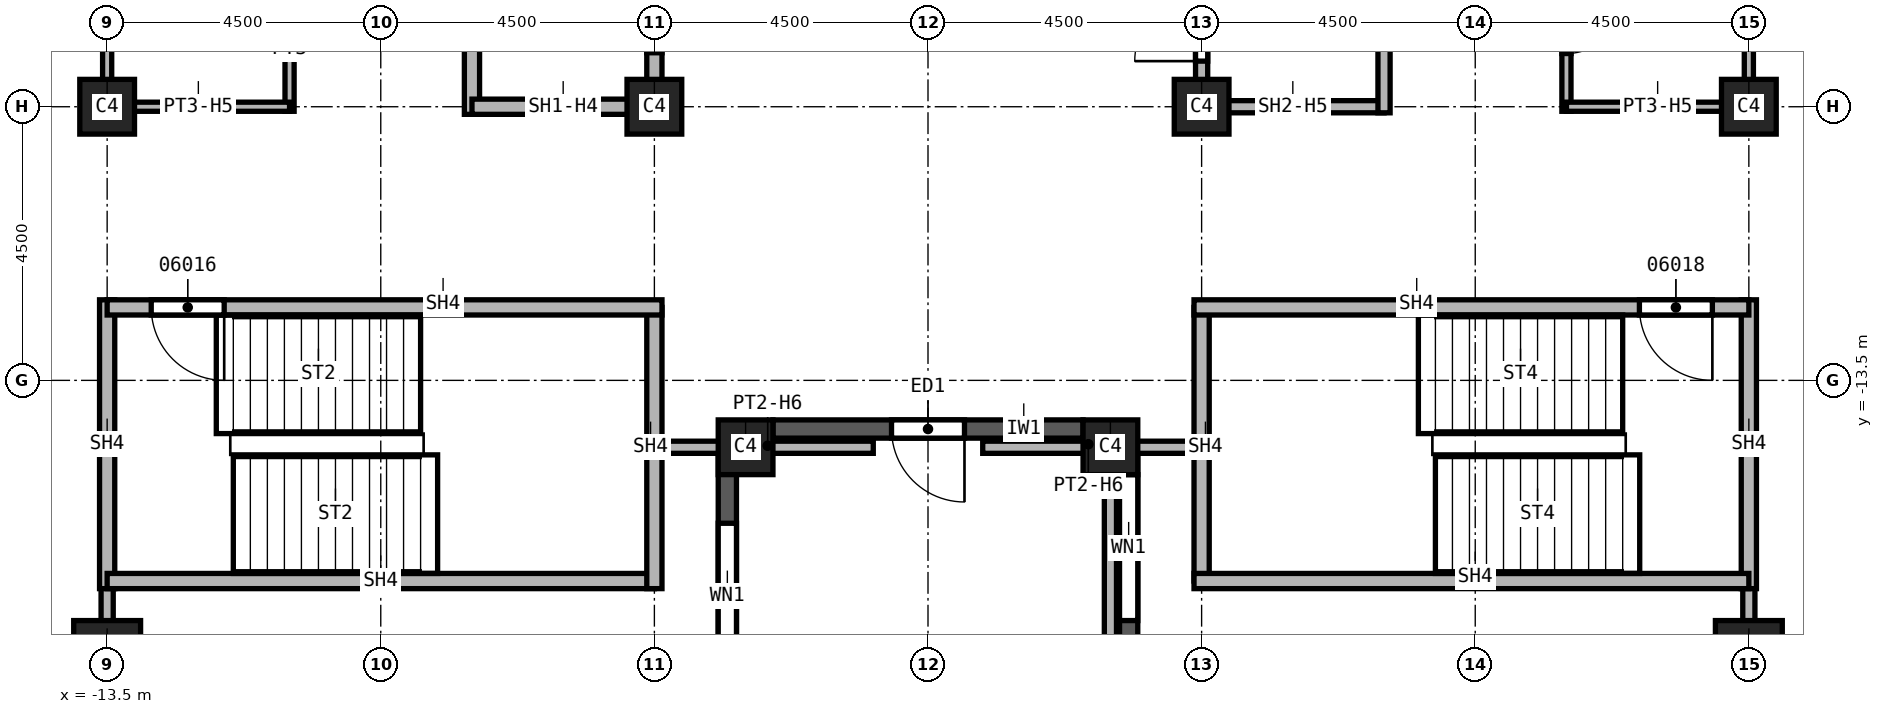
"""IFC4 building model, lengths in metres.
Left out: names, types, materials, properties, quantities, classifications, styles, units other than length and angle.
Written with IfcOpenShell. Run it as: python <this file> out.ifc"""

import sys

from ifc_helpers import new_model, si_unit, direction, frame, frame_2d, origin, origin_2d, place, context, subcontext, project, spatial, rectangle, extrude, element, fill, save


model = new_model("IFC4")
c1 = context("Model", 3, precision=1e-05, world=origin(), true_north=direction((0.0, 1.0)))
c2 = subcontext(c1, "Body", "Model", "MODEL_VIEW")
j1 = project(units=[si_unit("LENGTHUNIT", "METRE"), si_unit("PLANEANGLEUNIT", "RADIAN")], contexts=[c1])
p1 = place(None, origin())
s1 = spatial("IfcSite", under=j1, at=p1, CompositionType="ELEMENT")
p2 = place(p1, origin())
s2 = spatial("IfcBuilding", under=s1, at=p2, CompositionType="ELEMENT")
p3 = place(p2, frame((0.0, 0.0, 126.0)))
s3 = spatial("IfcBuildingStorey", under=s2, at=p3, CompositionType="ELEMENT", Elevation=126.0)
for number, where, z_axis, x_axis in (
    (1, (13.5, -18.0, 0.0), (0.0, 0.0, 1.0), (1.0, 0.0, 0.0)),
    (2, (-13.5, -18.0, 0.0), (0.0, 0.0, 1.0), (1.0, 0.0, 0.0)),
):
    element("IfcColumn", number, at=place(p3, frame(where, z_axis=z_axis, x_axis=x_axis)), inside=s3, PredefinedType="COLUMN", context=c2, shape_type="SweptSolid", body=[
        extrude(rectangle(XDim=1.1, YDim=1.1, at=origin_2d()), origin(), (0.0, 0.0, 1.0), 3.7),
    ])
for number, where, z_axis, x_axis in (
    (3, (4.5, -9.0, 0.0), (0.0, 0.0, 1.0), (1.0, 0.0, 0.0)),
    (4, (13.5, -9.0, 0.0), (0.0, 0.0, 1.0), (1.0, 0.0, 0.0)),
    (5, (-4.5, -9.0, 0.0), (0.0, 0.0, 1.0), (1.0, 0.0, 0.0)),
    (6, (-13.5, -9.0, 0.0), (0.0, 0.0, 1.0), (1.0, 0.0, 0.0)),
    (7, (3.0, -14.6, 0.0), (0.0, 0.0, 1.0), (1.0, 0.0, 0.0)),
    (8, (-3.0, -14.6, 0.0), (0.0, 0.0, 1.0), (1.0, 0.0, 0.0)),
):
    element("IfcColumn", number, at=place(p3, frame(where, z_axis=z_axis, x_axis=x_axis)), inside=s3, PredefinedType="COLUMN", context=c2, shape_type="SweptSolid", body=[
        extrude(rectangle(XDim=0.9, YDim=0.9, at=origin_2d()), origin(), (0.0, 0.0, 1.0), 3.7),
    ])
p4 = place(p3, frame((-3.3, -23.05, 0.0), z_axis=(0.0, 0.0, 1.0), x_axis=(0.0, 1.0, 0.0)))
e9 = element("IfcWall", 9, at=p4, inside=s3, PredefinedType="SOLIDWALL", context=c2, shape_type="SweptSolid", body=[
    extrude(rectangle(XDim=8.4, YDim=0.3, at=frame_2d((4.2, 0.0))), origin(), (0.0, 0.0, 1.0), 3.1),
])
p5 = place(p4, frame((0.8, 0.0, 0.8)))
e10 = element("IfcOpeningElement", 10, at=p5, cuts=e9, PredefinedType="OPENING", context=c2, shape_type="SweptSolid", body=[
    extrude(rectangle(XDim=2.4, YDim=1.95, at=frame_2d((1.2, 0.975))), frame((0.0, 0.15, 0.0), z_axis=(0.0, -1.0, 0.0), x_axis=(1.0, 0.0, 0.0)), (0.0, 0.0, 1.0), 0.3),
])
p6 = place(p4, frame((4.8, 0.0, 0.8)))
e11 = element("IfcOpeningElement", 11, at=p6, cuts=e9, PredefinedType="OPENING", context=c2, shape_type="SweptSolid", body=[
    extrude(rectangle(XDim=2.4, YDim=1.95, at=frame_2d((1.2, 0.975))), frame((0.0, 0.15, 0.0), z_axis=(0.0, -1.0, 0.0), x_axis=(1.0, 0.0, 0.0)), (0.0, 0.0, 1.0), 0.3),
])
p7 = place(p3, frame((2.55, -14.3, 0.0), z_axis=(0.0, 0.0, 1.0), x_axis=(-1.0, 0.0, 0.0)))
e12 = element("IfcWall", 12, at=p7, inside=s3, PredefinedType="SOLIDWALL", context=c2, shape_type="SweptSolid", body=[
    extrude(rectangle(XDim=5.1, YDim=0.3, at=frame_2d((2.55, 0.0))), origin(), (0.0, 0.0, 1.0), 3.1),
])
p8 = place(p7, frame((1.95, 0.0, 0.0)))
e13 = element("IfcOpeningElement", 13, at=p8, cuts=e12, PredefinedType="OPENING", context=c2, shape_type="SweptSolid", body=[
    extrude(rectangle(XDim=1.2, YDim=2.4, at=frame_2d((0.6, 1.2))), frame((0.0, 0.15, 0.0), z_axis=(0.0, -1.0, 0.0), x_axis=(1.0, 0.0, 0.0)), (0.0, 0.0, 1.0), 0.3),
])
p9 = place(p3, frame((3.3, -14.65, 0.0), z_axis=(0.0, 0.0, 1.0), x_axis=(0.0, -1.0, 0.0)))
e14 = element("IfcWall", 14, at=p9, inside=s3, PredefinedType="SOLIDWALL", context=c2, shape_type="SweptSolid", body=[
    extrude(rectangle(XDim=8.4, YDim=0.3, at=frame_2d((4.2, 0.0))), origin(), (0.0, 0.0, 1.0), 3.1),
])
p10 = place(p9, frame((0.4, 0.0, 0.8)))
e15 = element("IfcOpeningElement", 15, at=p10, cuts=e14, PredefinedType="OPENING", context=c2, shape_type="SweptSolid", body=[
    extrude(rectangle(XDim=2.4, YDim=1.95, at=frame_2d((1.2, 0.975))), frame((0.0, 0.15, 0.0), z_axis=(0.0, -1.0, 0.0), x_axis=(1.0, 0.0, 0.0)), (0.0, 0.0, 1.0), 0.3),
])
p11 = place(p9, frame((4.4, 0.0, 0.8)))
e16 = element("IfcOpeningElement", 16, at=p11, cuts=e14, PredefinedType="OPENING", context=c2, shape_type="SweptSolid", body=[
    extrude(rectangle(XDim=2.4, YDim=1.95, at=frame_2d((1.2, 0.975))), frame((0.0, 0.15, 0.0), z_axis=(0.0, -1.0, 0.0), x_axis=(1.0, 0.0, 0.0)), (0.0, 0.0, 1.0), 0.3),
])
p12 = place(p3, frame((-13.5, -16.675, 0.0), z_axis=(0.0, 0.0, 1.0), x_axis=(0.0, -1.0, 0.0)))
e17 = element("IfcWall", 17, at=p12, inside=s3, PredefinedType="PARTITIONING", context=c2, shape_type="SweptSolid", body=[
    extrude(rectangle(XDim=6.375, YDim=0.2, at=frame_2d((3.188, 0.0))), origin(), (0.0, 0.0, 1.0), 3.7),
])
p13 = place(p12, frame((2.2, 0.0, 0.0)))
e18 = element("IfcOpeningElement", 18, at=p13, cuts=e17, PredefinedType="OPENING", context=c2, shape_type="SweptSolid", body=[
    extrude(rectangle(XDim=1.0, YDim=2.1, at=frame_2d((0.5, 1.05))), frame((0.0, 0.1, 0.0), z_axis=(0.0, -1.0, 0.0), x_axis=(1.0, 0.0, 0.0)), (0.0, 0.0, 1.0), 0.2),
])
p14 = place(p3, frame((-0.9, -14.6, 0.0), z_axis=(0.0, 0.0, 1.0), x_axis=(-1.0, 0.0, 0.0)))
e19 = element("IfcWall", 19, at=p14, inside=s3, PredefinedType="PARTITIONING", context=c2, shape_type="SweptSolid", body=[
    extrude(rectangle(XDim=3.6, YDim=0.2, at=frame_2d((1.8, 0.0))), origin(), (0.0, 0.0, 1.0), 3.088),
])
p15 = place(p3, frame((3.0, -14.6, 0.0), z_axis=(0.0, 0.0, 1.0), x_axis=(0.0, -1.0, 0.0)))
e20 = element("IfcWall", 20, at=p15, inside=s3, PredefinedType="PARTITIONING", context=c2, shape_type="SweptSolid", body=[
    extrude(rectangle(XDim=8.45, YDim=0.2, at=frame_2d((4.225, 0.0))), origin(), (0.0, 0.0, 1.0), 2.854),
])
p16 = place(p3, frame((4.5, -14.6, 0.0), z_axis=(0.0, 0.0, 1.0), x_axis=(-1.0, 0.0, 0.0)))
e21 = element("IfcWall", 21, at=p16, inside=s3, PredefinedType="PARTITIONING", context=c2, shape_type="SweptSolid", body=[
    extrude(rectangle(XDim=3.6, YDim=0.2, at=frame_2d((1.8, 0.0))), origin(), (0.0, 0.0, 1.0), 3.088),
])
p17 = place(p3, frame((13.5, -23.05, 0.0), z_axis=(0.0, 0.0, 1.0), x_axis=(0.0, 1.0, 0.0)))
e22 = element("IfcWall", 22, at=p17, inside=s3, PredefinedType="PARTITIONING", context=c2, shape_type="SweptSolid", body=[
    extrude(rectangle(XDim=6.375, YDim=0.2, at=frame_2d((3.188, 0.0))), origin(), (0.0, 0.0, 1.0), 3.7),
])
p18 = place(p17, frame((0.85, 0.0, 0.0)))
e23 = element("IfcOpeningElement", 23, at=p18, cuts=e22, PredefinedType="OPENING", context=c2, shape_type="SweptSolid", body=[
    extrude(rectangle(XDim=1.0, YDim=2.1, at=frame_2d((0.5, 1.05))), frame((0.0, 0.1, 0.0), z_axis=(0.0, -1.0, 0.0), x_axis=(1.0, 0.0, 0.0)), (0.0, 0.0, 1.0), 0.2),
])
p19 = place(p3, frame((4.5, -9.1, 0.0), z_axis=(0.0, 0.0, 1.0), x_axis=(0.0, 1.0, 0.0)))
e24 = element("IfcWall", 24, at=p19, inside=s3, PredefinedType="SOLIDWALL", context=c2, shape_type="SweptSolid", body=[
    extrude(rectangle(XDim=9.1, YDim=0.2, at=frame_2d((4.55, 0.0))), origin(), (0.0, 0.0, 1.0), 2.938),
])
p20 = place(p19, frame((0.85, 0.0, 0.0)))
e25 = element("IfcOpeningElement", 25, at=p20, cuts=e24, PredefinedType="OPENING", context=c2, shape_type="SweptSolid", body=[
    extrude(rectangle(XDim=1.1, YDim=2.1, at=frame_2d((0.55, 1.05))), frame((0.0, 0.1, 0.0), z_axis=(0.0, -1.0, 0.0), x_axis=(1.0, 0.0, 0.0)), (0.0, 0.0, 1.0), 0.2),
])
p21 = place(p19, frame((7.25, 0.0, 0.0)))
e26 = element("IfcOpeningElement", 26, at=p21, cuts=e24, PredefinedType="OPENING", context=c2, shape_type="SweptSolid", body=[
    extrude(rectangle(XDim=1.1, YDim=2.1, at=frame_2d((0.55, 1.05))), frame((0.0, 0.1, 0.0), z_axis=(0.0, -1.0, 0.0), x_axis=(1.0, 0.0, 0.0)), (0.0, 0.0, 1.0), 0.2),
])
p22 = place(p3, frame((7.5, -9.0, 0.0), z_axis=(0.0, 0.0, 1.0), x_axis=(-1.0, 0.0, 0.0)))
e27 = element("IfcWall", 27, at=p22, inside=s3, PredefinedType="SOLIDWALL", context=c2, shape_type="SweptSolid", body=[
    extrude(rectangle(XDim=3.0, YDim=0.2, at=frame_2d((1.5, 0.0))), origin(), (0.0, 0.0, 1.0), 2.938),
])
p23 = place(p3, frame((7.5, -2.875, 0.0), z_axis=(0.0, 0.0, 1.0), x_axis=(0.0, -1.0, 0.0)))
e28 = element("IfcWall", 28, at=p23, inside=s3, PredefinedType="SOLIDWALL", context=c2, shape_type="SweptSolid", body=[
    extrude(rectangle(XDim=6.225, YDim=0.2, at=frame_2d((3.113, 0.0))), origin(), (0.0, 0.0, 1.0), 3.7),
])
p24 = place(p3, frame((-7.5, -9.125, 0.0), z_axis=(0.0, 0.0, 1.0), x_axis=(0.0, 1.0, 0.0)))
e29 = element("IfcWall", 29, at=p24, inside=s3, PredefinedType="SOLIDWALL", context=c2, shape_type="SweptSolid", body=[
    extrude(rectangle(XDim=12.25, YDim=0.25, at=frame_2d((6.125, 0.0))), origin(), (0.0, 0.0, 1.0), 3.7),
])
p25 = place(p3, frame((-4.5, -9.0, 0.0), z_axis=(0.0, 0.0, 1.0), x_axis=(-1.0, 0.0, 0.0)))
e30 = element("IfcWall", 30, at=p25, inside=s3, PredefinedType="SOLIDWALL", context=c2, shape_type="SweptSolid", body=[
    extrude(rectangle(XDim=3.0, YDim=0.25, at=frame_2d((1.5, 0.0))), origin(), (0.0, 0.0, 1.0), 2.938),
])
p26 = place(p3, frame((-4.5, 0.0, 0.0), z_axis=(0.0, 0.0, 1.0), x_axis=(0.0, -1.0, 0.0)))
e31 = element("IfcWall", 31, at=p26, inside=s3, PredefinedType="SOLIDWALL", context=c2, shape_type="SweptSolid", body=[
    extrude(rectangle(XDim=9.125, YDim=0.25, at=frame_2d((4.562, 0.0))), origin(), (0.0, 0.0, 1.0), 2.938),
])
p27 = place(p26, frame((7.012, 0.0, 0.0)))
e32 = element("IfcOpeningElement", 32, at=p27, cuts=e31, PredefinedType="OPENING", context=c2, shape_type="SweptSolid", body=[
    extrude(rectangle(XDim=1.1, YDim=2.1, at=frame_2d((0.55, 1.05))), frame((0.0, 0.125, 0.0), z_axis=(0.0, -1.0, 0.0), x_axis=(1.0, 0.0, 0.0)), (0.0, 0.0, 1.0), 0.25),
])
p28 = place(p26, frame((3.95, 0.0, 0.0)))
e33 = element("IfcOpeningElement", 33, at=p28, cuts=e31, PredefinedType="OPENING", context=c2, shape_type="SweptSolid", body=[
    extrude(rectangle(XDim=1.1, YDim=2.1, at=frame_2d((0.55, 1.05))), frame((0.0, 0.125, 0.0), z_axis=(0.0, -1.0, 0.0), x_axis=(1.0, 0.0, 0.0)), (0.0, 0.0, 1.0), 0.25),
])
p29 = place(p26, frame((0.95, 0.0, 0.0)))
e34 = element("IfcOpeningElement", 34, at=p29, cuts=e31, PredefinedType="OPENING", context=c2, shape_type="SweptSolid", body=[
    extrude(rectangle(XDim=1.1, YDim=2.1, at=frame_2d((0.55, 1.05))), frame((0.0, 0.125, 0.0), z_axis=(0.0, -1.0, 0.0), x_axis=(1.0, 0.0, 0.0)), (0.0, 0.0, 1.0), 0.25),
])
p30 = place(p3, frame((-13.5, -12.175, 0.0), z_axis=(0.0, 0.0, 1.0), x_axis=(0.0, -1.0, 0.0)))
e35 = element("IfcWall", 35, at=p30, inside=s3, PredefinedType="SOLIDWALL", context=c2, shape_type="SweptSolid", body=[
    extrude(rectangle(XDim=4.75, YDim=0.25, at=frame_2d((2.375, 0.0))), origin(), (0.0, 0.0, 1.0), 3.7),
])
p31 = place(p3, frame((-4.5, -16.8, 0.0), z_axis=(0.0, 0.0, 1.0), x_axis=(-1.0, 0.0, 0.0)))
e36 = element("IfcWall", 36, at=p31, inside=s3, PredefinedType="SOLIDWALL", context=c2, shape_type="SweptSolid", body=[
    extrude(rectangle(XDim=9.0, YDim=0.25, at=frame_2d((4.5, 0.0))), origin(), (0.0, 0.0, 1.0), 3.7),
])
p32 = place(p3, frame((-4.5, -12.3, 0.0), z_axis=(0.0, 0.0, 1.0), x_axis=(0.0, -1.0, 0.0)))
e37 = element("IfcWall", 37, at=p32, inside=s3, PredefinedType="SOLIDWALL", context=c2, shape_type="SweptSolid", body=[
    extrude(rectangle(XDim=4.625, YDim=0.25, at=frame_2d((2.312, 0.0))), origin(), (0.0, 0.0, 1.0), 3.7),
])
p33 = place(p3, frame((-4.375, -12.3, 0.0), z_axis=(0.0, 0.0, 1.0), x_axis=(-1.0, 0.0, 0.0)))
e38 = element("IfcWall", 38, at=p33, inside=s3, PredefinedType="SOLIDWALL", context=c2, shape_type="SweptSolid", body=[
    extrude(rectangle(XDim=9.125, YDim=0.25, at=frame_2d((4.562, 0.0))), origin(), (0.0, 0.0, 1.0), 3.7),
])
p34 = place(p33, frame((7.2, 0.0, 0.0)))
e39 = element("IfcOpeningElement", 39, at=p34, cuts=e38, PredefinedType="OPENING", context=c2, shape_type="SweptSolid", body=[
    extrude(rectangle(XDim=1.2, YDim=2.1, at=frame_2d((0.6, 1.05))), frame((0.0, 0.125, 0.0), z_axis=(0.0, -1.0, 0.0), x_axis=(1.0, 0.0, 0.0)), (0.0, 0.0, 1.0), 0.25),
])
p35 = place(p3, frame((4.5, -16.8, 0.0), z_axis=(0.0, 0.0, 1.0), x_axis=(0.0, 1.0, 0.0)))
e40 = element("IfcWall", 40, at=p35, inside=s3, PredefinedType="SOLIDWALL", context=c2, shape_type="SweptSolid", body=[
    extrude(rectangle(XDim=4.5, YDim=0.25, at=frame_2d((2.25, 0.0))), origin(), (0.0, 0.0, 1.0), 3.7),
])
p36 = place(p3, frame((13.5, -16.925, 0.0), z_axis=(0.0, 0.0, 1.0), x_axis=(0.0, 1.0, 0.0)))
e41 = element("IfcWall", 41, at=p36, inside=s3, PredefinedType="SOLIDWALL", context=c2, shape_type="SweptSolid", body=[
    extrude(rectangle(XDim=4.75, YDim=0.25, at=frame_2d((2.375, 0.0))), origin(), (0.0, 0.0, 1.0), 3.7),
])
p37 = place(p3, frame((13.5, -16.8, 0.0), z_axis=(0.0, 0.0, 1.0), x_axis=(-1.0, 0.0, 0.0)))
e42 = element("IfcWall", 42, at=p37, inside=s3, PredefinedType="SOLIDWALL", context=c2, shape_type="SweptSolid", body=[
    extrude(rectangle(XDim=9.125, YDim=0.25, at=frame_2d((4.562, 0.0))), origin(), (0.0, 0.0, 1.0), 3.7),
])
p38 = place(p3, frame((13.5, -12.3, 0.0), z_axis=(0.0, 0.0, 1.0), x_axis=(-1.0, 0.0, 0.0)))
e43 = element("IfcWall", 43, at=p38, inside=s3, PredefinedType="SOLIDWALL", context=c2, shape_type="SweptSolid", body=[
    extrude(rectangle(XDim=9.125, YDim=0.25, at=frame_2d((4.562, 0.0))), origin(), (0.0, 0.0, 1.0), 3.7),
])
p39 = place(p38, frame((0.6, 0.0, 0.0)))
e44 = element("IfcOpeningElement", 44, at=p39, cuts=e43, PredefinedType="OPENING", context=c2, shape_type="SweptSolid", body=[
    extrude(rectangle(XDim=1.2, YDim=2.1, at=frame_2d((0.6, 1.05))), frame((0.0, 0.125, 0.0), z_axis=(0.0, -1.0, 0.0), x_axis=(1.0, 0.0, 0.0)), (0.0, 0.0, 1.0), 0.25),
])
p40 = place(p3, frame((-13.5, -9.075, 0.0), z_axis=(0.0, 0.0, 1.0), x_axis=(0.0, 1.0, 0.0)))
e45 = element("IfcWall", 45, at=p40, inside=s3, PredefinedType="PARTITIONING", context=c2, shape_type="SweptSolid", body=[
    extrude(rectangle(XDim=3.075, YDim=0.15, at=frame_2d((1.538, 0.0))), origin(), (0.0, 0.0, 1.0), 2.938),
])
p41 = place(p3, frame((-10.5, -9.075, 0.0), z_axis=(0.0, 0.0, 1.0), x_axis=(0.0, 1.0, 0.0)))
e46 = element("IfcWall", 46, at=p41, inside=s3, PredefinedType="PARTITIONING", context=c2, shape_type="SweptSolid", body=[
    extrude(rectangle(XDim=3.15, YDim=0.15, at=frame_2d((1.575, 0.0))), origin(), (0.0, 0.0, 1.0), 3.7),
])
p42 = place(p41, frame((1.9, 0.0, 0.0)))
e47 = element("IfcOpeningElement", 47, at=p42, cuts=e46, PredefinedType="OPENING", context=c2, shape_type="SweptSolid", body=[
    extrude(rectangle(XDim=0.9, YDim=2.1, at=frame_2d((0.45, 1.05))), frame((0.0, 0.075, 0.0), z_axis=(0.0, -1.0, 0.0), x_axis=(1.0, 0.0, 0.0)), (0.0, 0.0, 1.0), 0.15),
])
p43 = place(p3, frame((-10.5, -9.0, 0.0), z_axis=(0.0, 0.0, 1.0), x_axis=(-1.0, 0.0, 0.0)))
e48 = element("IfcWall", 48, at=p43, inside=s3, PredefinedType="PARTITIONING", context=c2, shape_type="SweptSolid", body=[
    extrude(rectangle(XDim=3.0, YDim=0.15, at=frame_2d((1.5, 0.0))), origin(), (0.0, 0.0, 1.0), 2.938),
])
p44 = place(p3, frame((10.5, -4.425, 0.0), z_axis=(0.0, 0.0, 1.0), x_axis=(0.0, -1.0, 0.0)))
e49 = element("IfcWall", 49, at=p44, inside=s3, PredefinedType="PARTITIONING", context=c2, shape_type="SweptSolid", body=[
    extrude(rectangle(XDim=4.65, YDim=0.15, at=frame_2d((2.325, 0.0))), origin(), (0.0, 0.0, 1.0), 3.7),
])
p45 = place(p44, frame((2.8, 0.0, 0.0)))
e50 = element("IfcOpeningElement", 50, at=p45, cuts=e49, PredefinedType="OPENING", context=c2, shape_type="SweptSolid", body=[
    extrude(rectangle(XDim=0.9, YDim=2.1, at=frame_2d((0.45, 1.05))), frame((0.0, 0.075, 0.0), z_axis=(0.0, -1.0, 0.0), x_axis=(1.0, 0.0, 0.0)), (0.0, 0.0, 1.0), 0.15),
])
p46 = place(p3, frame((13.5, -9.0, 0.0), z_axis=(0.0, 0.0, 1.0), x_axis=(-1.0, 0.0, 0.0)))
e51 = element("IfcWall", 51, at=p46, inside=s3, PredefinedType="PARTITIONING", context=c2, shape_type="SweptSolid", body=[
    extrude(rectangle(XDim=3.0, YDim=0.15, at=frame_2d((1.5, 0.0))), origin(), (0.0, 0.0, 1.0), 2.938),
])
p47 = place(p3, frame((13.5, -4.5, 0.0), z_axis=(0.0, 0.0, 1.0), x_axis=(0.0, -1.0, 0.0)))
e52 = element("IfcWall", 52, at=p47, inside=s3, PredefinedType="PARTITIONING", context=c2, shape_type="SweptSolid", body=[
    extrude(rectangle(XDim=4.575, YDim=0.15, at=frame_2d((2.288, 0.0))), origin(), (0.0, 0.0, 1.0), 2.938),
])
p48 = place(p6, origin())
e53 = element("IfcWindow", 53, at=p48, inside=s3, PartitioningType="SINGLE_PANEL", PredefinedType="WINDOW", context=c2, shape_type="SweptSolid", body=[
    extrude(rectangle(XDim=2.4, YDim=1.95, at=frame_2d((1.2, 0.975))), frame((0.0, 0.03, 0.0), z_axis=(0.0, -1.0, 0.0), x_axis=(1.0, 0.0, 0.0)), (0.0, 0.0, 1.0), 0.06),
])
fill(e11, e53)
p49 = place(p8, origin())
e54 = element("IfcDoor", 54, at=p49, inside=s3, OperationType="SINGLE_SWING_LEFT", PredefinedType="DOOR", context=c2, shape_type="SweptSolid", body=[
    extrude(rectangle(XDim=1.2, YDim=2.4, at=frame_2d((0.6, 1.2))), frame((0.0, 0.025, 0.0), z_axis=(0.0, -1.0, 0.0), x_axis=(1.0, 0.0, 0.0)), (0.0, 0.0, 1.0), 0.05),
])
fill(e13, e54)
p50 = place(p10, origin())
e55 = element("IfcWindow", 55, at=p50, inside=s3, PartitioningType="SINGLE_PANEL", PredefinedType="WINDOW", context=c2, shape_type="SweptSolid", body=[
    extrude(rectangle(XDim=2.4, YDim=1.95, at=frame_2d((1.2, 0.975))), frame((0.0, 0.03, 0.0), z_axis=(0.0, -1.0, 0.0), x_axis=(1.0, 0.0, 0.0)), (0.0, 0.0, 1.0), 0.06),
])
fill(e15, e55)
p51 = place(p20, origin())
e56 = element("IfcDoor", 56, at=p51, inside=s3, OperationType="SINGLE_SWING_LEFT", PredefinedType="DOOR", context=c2, shape_type="SweptSolid", body=[
    extrude(rectangle(XDim=1.1, YDim=2.1, at=frame_2d((0.55, 1.05))), frame((0.0, 0.025, 0.0), z_axis=(0.0, -1.0, 0.0), x_axis=(1.0, 0.0, 0.0)), (0.0, 0.0, 1.0), 0.05),
])
fill(e25, e56)
p52 = place(p45, origin())
e57 = element("IfcDoor", 57, at=p52, inside=s3, OperationType="SINGLE_SWING_LEFT", PredefinedType="DOOR", context=c2, shape_type="SweptSolid", body=[
    extrude(rectangle(XDim=0.9, YDim=2.1, at=frame_2d((0.45, 1.05))), frame((0.0, 0.025, 0.0), z_axis=(0.0, -1.0, 0.0), x_axis=(1.0, 0.0, 0.0)), (0.0, 0.0, 1.0), 0.05),
])
fill(e50, e57)
p53 = place(p34, origin())
e58 = element("IfcDoor", 58, at=p53, inside=s3, OperationType="SINGLE_SWING_LEFT", PredefinedType="DOOR", context=c2, shape_type="SweptSolid", body=[
    extrude(rectangle(XDim=1.2, YDim=2.1, at=frame_2d((0.6, 1.05))), frame((0.0, 0.025, 0.0), z_axis=(0.0, -1.0, 0.0), x_axis=(1.0, 0.0, 0.0)), (0.0, 0.0, 1.0), 0.05),
])
fill(e39, e58)
p54 = place(p39, origin())
e59 = element("IfcDoor", 59, at=p54, inside=s3, OperationType="SINGLE_SWING_LEFT", PredefinedType="DOOR", context=c2, shape_type="SweptSolid", body=[
    extrude(rectangle(XDim=1.2, YDim=2.1, at=frame_2d((0.6, 1.05))), frame((0.0, 0.025, 0.0), z_axis=(0.0, -1.0, 0.0), x_axis=(1.0, 0.0, 0.0)), (0.0, 0.0, 1.0), 0.05),
])
fill(e44, e59)
p55 = place(p27, origin())
e60 = element("IfcDoor", 60, at=p55, inside=s3, OperationType="SLIDING_TO_LEFT", PredefinedType="DOOR", context=c2, shape_type="SweptSolid", body=[
    extrude(rectangle(XDim=1.1, YDim=2.1, at=frame_2d((0.55, 1.05))), frame((0.0, 0.025, 0.0), z_axis=(0.0, -1.0, 0.0), x_axis=(1.0, 0.0, 0.0)), (0.0, 0.0, 1.0), 0.05),
])
fill(e32, e60)
save(model, sys.argv[1])
